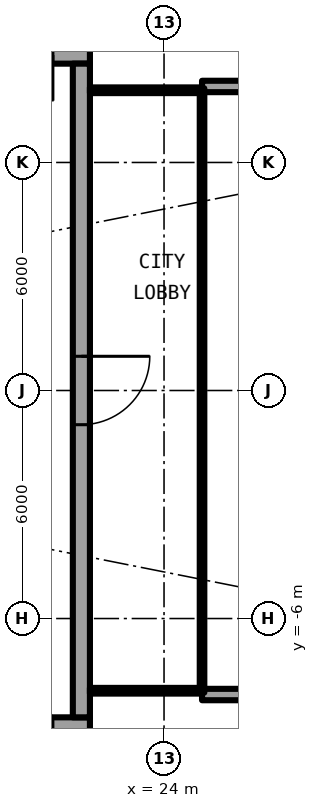
"""IFC4 building model, lengths in metres.
Left out: names, types, materials, properties, quantities, classifications, styles, units other than length and angle.
Written with IfcOpenShell. Run it as: python <this file> out.ifc"""

import sys

from ifc_helpers import new_model, si_unit, direction, frame, frame_2d, origin, place, context, subcontext, project, spatial, rectangle, extrude, element, fill, save


model = new_model("IFC4")
c1 = context("Model", 3, precision=1e-05, world=origin(), true_north=direction((0.0, 1.0)))
c2 = subcontext(c1, "Body", "Model", "MODEL_VIEW")
j1 = project(units=[si_unit("LENGTHUNIT", "METRE"), si_unit("PLANEANGLEUNIT", "RADIAN")], contexts=[c1])
p1 = place(None, origin())
s1 = spatial("IfcSite", under=j1, at=p1, CompositionType="ELEMENT")
p2 = place(p1, origin())
s2 = spatial("IfcBuilding", under=s1, at=p2, CompositionType="ELEMENT")
p3 = place(p2, frame((0.0, 0.0, 212.7)))
s3 = spatial("IfcBuildingStorey", under=s2, at=p3, CompositionType="ELEMENT", Elevation=212.7)
for number, where, z_axis, x_axis in (
    (1, (25.0, 8.0, 0.0), (0.0, 0.0, 1.0), (1.0, 0.0, 0.0)),
    (2, (25.0, -8.0, 0.0), (0.0, 0.0, 1.0), (1.0, 0.0, 0.0)),
):
    element("IfcWall", number, at=place(p3, frame(where, z_axis=z_axis, x_axis=x_axis)), inside=s3, PredefinedType="SOLIDWALL", context=c2, shape_type="SweptSolid", body=[
        extrude(rectangle(XDim=2.667, YDim=0.3, at=frame_2d((1.333, 0.0))), origin(), (0.0, 0.0, 1.0), 2.7),
    ])
p4 = place(p3, frame((22.05, 8.825, 0.0), z_axis=(0.0, 0.0, 1.0), x_axis=(-1.0, 0.0, 0.0)))
e3 = element("IfcWall", 3, at=p4, inside=s3, PredefinedType="SHEAR", context=c2, shape_type="SweptSolid", body=[
    extrude(rectangle(XDim=13.5, YDim=0.45, at=frame_2d((6.75, 0.0))), origin(), (0.0, 0.0, 1.0), 3.05),
])
p5 = place(p4, frame((0.975, 0.0, 0.0)))
e4 = element("IfcOpeningElement", 4, at=p5, cuts=e3, PredefinedType="OPENING", context=c2, shape_type="SweptSolid", body=[
    extrude(rectangle(XDim=1.2, YDim=2.3, at=frame_2d((0.6, 1.15))), frame((0.0, 0.235, 0.0), z_axis=(0.0, -1.0, 0.0), x_axis=(1.0, 0.0, 0.0)), (0.0, 0.0, 1.0), 0.47),
])
p6 = place(p3, frame((8.55, -8.825, 0.0), z_axis=(0.0, 0.0, 1.0), x_axis=(1.0, 0.0, 0.0)))
e5 = element("IfcWall", 5, at=p6, inside=s3, PredefinedType="SHEAR", context=c2, shape_type="SweptSolid", body=[
    extrude(rectangle(XDim=13.5, YDim=0.45, at=frame_2d((6.75, 0.0))), origin(), (0.0, 0.0, 1.0), 3.05),
])
p7 = place(p6, frame((11.325, 0.0, 0.0)))
e6 = element("IfcOpeningElement", 6, at=p7, cuts=e5, PredefinedType="OPENING", context=c2, shape_type="SweptSolid", body=[
    extrude(rectangle(XDim=1.2, YDim=2.3, at=frame_2d((0.6, 1.15))), frame((0.0, 0.235, 0.0), z_axis=(0.0, -1.0, 0.0), x_axis=(1.0, 0.0, 0.0)), (0.0, 0.0, 1.0), 0.47),
])
p8 = place(p3, frame((21.825, 8.6, 0.0), z_axis=(0.0, 0.0, 1.0), x_axis=(0.0, -1.0, 0.0)))
e7 = element("IfcWall", 7, at=p8, inside=s3, PredefinedType="SHEAR", context=c2, shape_type="SweptSolid", body=[
    extrude(rectangle(XDim=17.2, YDim=0.45, at=frame_2d((8.6, 0.0))), origin(), (0.0, 0.0, 1.0), 3.05),
])
p9 = place(p8, frame((7.7, 0.0, 0.0)))
e8 = element("IfcOpeningElement", 8, at=p9, cuts=e7, PredefinedType="OPENING", context=c2, shape_type="SweptSolid", body=[
    extrude(rectangle(XDim=1.8, YDim=2.3, at=frame_2d((0.9, 1.15))), frame((0.0, 0.235, 0.0), z_axis=(0.0, -1.0, 0.0), x_axis=(1.0, 0.0, 0.0)), (0.0, 0.0, 1.0), 0.47),
])
for number, where, z_axis, x_axis in (
    (9, (22.05, -7.9, 0.0), (0.0, 0.0, 1.0), (1.0, 0.0, 0.0)),
    (10, (22.05, 7.9, 0.0), (0.0, 0.0, 1.0), (1.0, 0.0, 0.0)),
):
    element("IfcWall", number, at=place(p3, frame(where, z_axis=z_axis, x_axis=x_axis)), inside=s3, PredefinedType="PARTITIONING", context=c2, shape_type="SweptSolid", body=[
        extrude(rectangle(XDim=2.89, YDim=0.15, at=frame_2d((1.445, 0.0))), origin(), (0.0, 0.0, 1.0), 2.7),
    ])
p10 = place(p3, frame((25.0, -7.95, 0.0), z_axis=(0.0, 0.0, 1.0), x_axis=(0.0, 1.0, 0.0)))
e11 = element("IfcWall", 11, at=p10, inside=s3, PredefinedType="PARTITIONING", context=c2, shape_type="SweptSolid", body=[
    extrude(rectangle(XDim=15.9, YDim=0.12, at=frame_2d((7.95, 0.0))), origin(), (0.0, 0.0, 1.0), 2.7),
])
p11 = place(p10, frame((0.95, 0.0, 0.1)))
e12 = element("IfcOpeningElement", 12, at=p11, cuts=e11, PredefinedType="OPENING", context=c2, shape_type="SweptSolid", body=[
    extrude(rectangle(XDim=14.0, YDim=2.35, at=frame_2d((7.0, 1.175))), frame((0.0, 0.07, 0.0), z_axis=(0.0, -1.0, 0.0), x_axis=(1.0, 0.0, 0.0)), (0.0, 0.0, 1.0), 0.14),
])
p12 = place(p5, origin())
e13 = element("IfcDoor", 13, at=p12, inside=s3, OperationType="SINGLE_SWING_RIGHT", PredefinedType="DOOR", context=c2, shape_type="SweptSolid", body=[
    extrude(rectangle(XDim=1.2, YDim=2.3, at=frame_2d((0.6, 1.15))), frame((0.0, 0.025, 0.0), z_axis=(0.0, -1.0, 0.0), x_axis=(1.0, 0.0, 0.0)), (0.0, 0.0, 1.0), 0.05),
])
fill(e4, e13)
p13 = place(p7, origin())
e14 = element("IfcDoor", 14, at=p13, inside=s3, OperationType="SINGLE_SWING_LEFT", PredefinedType="DOOR", context=c2, shape_type="SweptSolid", body=[
    extrude(rectangle(XDim=1.2, YDim=2.3, at=frame_2d((0.6, 1.15))), frame((0.0, 0.025, 0.0), z_axis=(0.0, -1.0, 0.0), x_axis=(1.0, 0.0, 0.0)), (0.0, 0.0, 1.0), 0.05),
])
fill(e6, e14)
p14 = place(p9, origin())
e15 = element("IfcDoor", 15, at=p14, inside=s3, OperationType="SINGLE_SWING_LEFT", PredefinedType="DOOR", context=c2, shape_type="SweptSolid", body=[
    extrude(rectangle(XDim=1.8, YDim=2.3, at=frame_2d((0.9, 1.15))), frame((0.0, 0.025, 0.0), z_axis=(0.0, -1.0, 0.0), x_axis=(1.0, 0.0, 0.0)), (0.0, 0.0, 1.0), 0.05),
])
fill(e8, e15)
p15 = place(p11, origin())
e16 = element("IfcWindow", 16, at=p15, inside=s3, PartitioningType="SINGLE_PANEL", PredefinedType="WINDOW", context=c2, shape_type="SweptSolid", body=[
    extrude(rectangle(XDim=14.0, YDim=2.35, at=frame_2d((7.0, 1.175))), frame((0.0, 0.03, 0.0), z_axis=(0.0, -1.0, 0.0), x_axis=(1.0, 0.0, 0.0)), (0.0, 0.0, 1.0), 0.06),
])
fill(e12, e16)
save(model, sys.argv[1])
